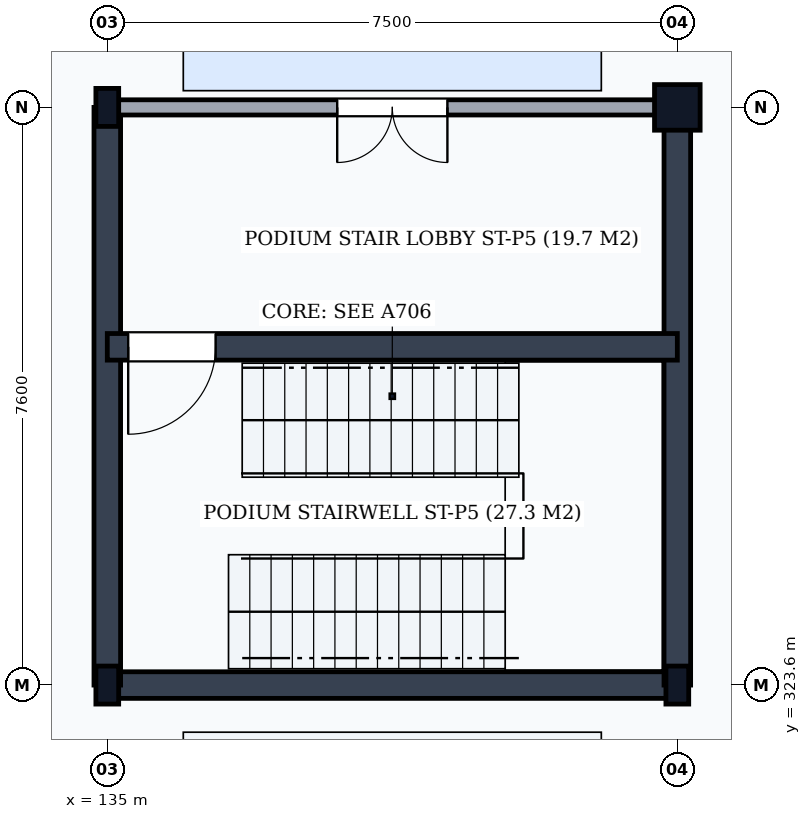
"""IFC4 building model, lengths in metres.
Left out: names, types, materials, properties, quantities, classifications, styles, units other than length and angle.
Written with IfcOpenShell. Run it as: python <this file> out.ifc"""

import sys

from ifc_helpers import new_model, si_unit, direction, frame, frame_2d, origin, origin_2d, place, context, subcontext, project, spatial, rectangle, i_section, extrude, element, fill, save


model = new_model("IFC4")
c1 = context("Model", 3, precision=1e-05, world=origin(), true_north=direction((0.0, 1.0)))
c2 = subcontext(c1, "Body", "Model", "MODEL_VIEW")
j1 = project(units=[si_unit("LENGTHUNIT", "METRE"), si_unit("PLANEANGLEUNIT", "RADIAN")], contexts=[c1])
p1 = place(None, origin())
s1 = spatial("IfcSite", under=j1, at=p1, CompositionType="ELEMENT")
p2 = place(p1, origin())
s2 = spatial("IfcBuilding", under=s1, at=p2, CompositionType="ELEMENT")
p3 = place(p2, frame((0.0, 0.0, -4.8)))
s3 = spatial("IfcBuildingStorey", under=s2, at=p3, CompositionType="ELEMENT", Elevation=-4.8)
for number, where, z_axis, x_axis in (
    (1, (135.0, 323.6, 0.0), (0.0, 0.0, 1.0), (1.0, 0.0, 0.0)),
    (2, (135.0, 331.2, 0.0), (0.0, 0.0, 1.0), (1.0, 0.0, 0.0)),
    (3, (142.5, 323.6, 0.0), (0.0, 0.0, 1.0), (1.0, 0.0, 0.0)),
):
    element("IfcColumn", number, at=place(p3, frame(where, z_axis=z_axis, x_axis=x_axis)), inside=s3, PredefinedType="COLUMN", context=c2, shape_type="SweptSolid", body=[
        extrude(i_section(OverallWidth=0.3, OverallDepth=0.5, WebThickness=0.014, FlangeThickness=0.028, FilletRadius=0.027, at=origin_2d()), origin(), (0.0, 0.0, 1.0), 4.8),
    ])
p4 = place(p3, frame((142.5, 331.2, 0.0), z_axis=(0.0, 0.0, 1.0), x_axis=(1.0, 0.0, 0.0)))
e4 = element("IfcColumn", 4, at=p4, inside=s3, PredefinedType="COLUMN", context=c2, shape_type="SweptSolid", body=[
    extrude(rectangle(XDim=0.6, YDim=0.6, at=origin_2d()), origin(), (0.0, 0.0, 1.0), 4.8),
])
p5 = place(p3, frame((135.0, 323.6, 0.0), z_axis=(0.0, 0.0, 1.0), x_axis=(1.0, 0.0, 0.0)))
e5 = element("IfcWall", 5, at=p5, inside=s3, PredefinedType="SHEAR", context=c2, shape_type="SweptSolid", body=[
    extrude(rectangle(XDim=7.5, YDim=0.35, at=frame_2d((3.75, 0.0))), origin(), (0.0, 0.0, 1.0), 4.51),
])
for number, where, z_axis, x_axis in (
    (6, (135.0, 323.6, 0.0), (0.0, 0.0, 1.0), (0.0, 1.0, 0.0)),
    (7, (142.5, 323.6, 0.0), (0.0, 0.0, 1.0), (0.0, 1.0, 0.0)),
):
    element("IfcWall", number, at=place(p3, frame(where, z_axis=z_axis, x_axis=x_axis)), inside=s3, PredefinedType="SHEAR", context=c2, shape_type="SweptSolid", body=[
        extrude(rectangle(XDim=7.6, YDim=0.35, at=frame_2d((3.8, 0.0))), origin(), (0.0, 0.0, 1.0), 4.51),
    ])
p6 = place(p3, frame((135.0, 328.05, 0.0), z_axis=(0.0, 0.0, 1.0), x_axis=(1.0, 0.0, 0.0)))
e8 = element("IfcWall", 8, at=p6, inside=s3, PredefinedType="SHEAR", context=c2, shape_type="SweptSolid", body=[
    extrude(rectangle(XDim=7.5, YDim=0.35, at=frame_2d((3.75, 0.0))), origin(), (0.0, 0.0, 1.0), 4.51),
])
p7 = place(p6, frame((0.275, 0.0, 0.0)))
e9 = element("IfcOpeningElement", 9, at=p7, cuts=e8, PredefinedType="OPENING", context=c2, shape_type="SweptSolid", body=[
    extrude(rectangle(XDim=1.15, YDim=2.15, at=frame_2d((0.575, 1.075))), frame((0.0, 0.19, 0.0), z_axis=(0.0, -1.0, 0.0), x_axis=(1.0, 0.0, 0.0)), (0.0, 0.0, 1.0), 0.38),
])
p8 = place(p3, frame((135.0, 331.2, 0.0), z_axis=(0.0, 0.0, 1.0), x_axis=(1.0, 0.0, 0.0)))
e10 = element("IfcWall", 10, at=p8, inside=s3, PredefinedType="PARTITIONING", context=c2, shape_type="SweptSolid", body=[
    extrude(rectangle(XDim=7.5, YDim=0.2, at=frame_2d((3.75, 0.0))), origin(), (0.0, 0.0, 1.0), 3.908),
])
p9 = place(p8, frame((3.025, 0.0, 0.0)))
e11 = element("IfcOpeningElement", 11, at=p9, cuts=e10, PredefinedType="OPENING", context=c2, shape_type="SweptSolid", body=[
    extrude(rectangle(XDim=1.45, YDim=2.2, at=frame_2d((0.725, 1.1))), frame((0.0, 0.115, 0.0), z_axis=(0.0, -1.0, 0.0), x_axis=(1.0, 0.0, 0.0)), (0.0, 0.0, 1.0), 0.23),
])
p10 = place(p7, frame((1.15, 0.0, 0.0), z_axis=(0.0, 0.0, 1.0), x_axis=(-1.0, 0.0, 0.0)))
e12 = element("IfcDoor", 12, at=p10, inside=s3, OperationType="SINGLE_SWING_RIGHT", PredefinedType="DOOR", context=c2, shape_type="SweptSolid", body=[
    extrude(rectangle(XDim=1.15, YDim=2.15, at=frame_2d((0.575, 1.075))), frame((0.0, 0.025, 0.0), z_axis=(0.0, -1.0, 0.0), x_axis=(1.0, 0.0, 0.0)), (0.0, 0.0, 1.0), 0.05),
])
fill(e9, e12)
p11 = place(p9, frame((1.45, 0.0, 0.0), z_axis=(0.0, 0.0, 1.0), x_axis=(-1.0, 0.0, 0.0)))
e13 = element("IfcDoor", 13, at=p11, inside=s3, OperationType="DOUBLE_DOOR_SINGLE_SWING", PredefinedType="DOOR", context=c2, shape_type="SweptSolid", body=[
    extrude(rectangle(XDim=1.45, YDim=2.2, at=frame_2d((0.725, 1.1))), frame((0.0, 0.025, 0.0), z_axis=(0.0, -1.0, 0.0), x_axis=(1.0, 0.0, 0.0)), (0.0, 0.0, 1.0), 0.05),
])
fill(e11, e13)
save(model, sys.argv[1])
